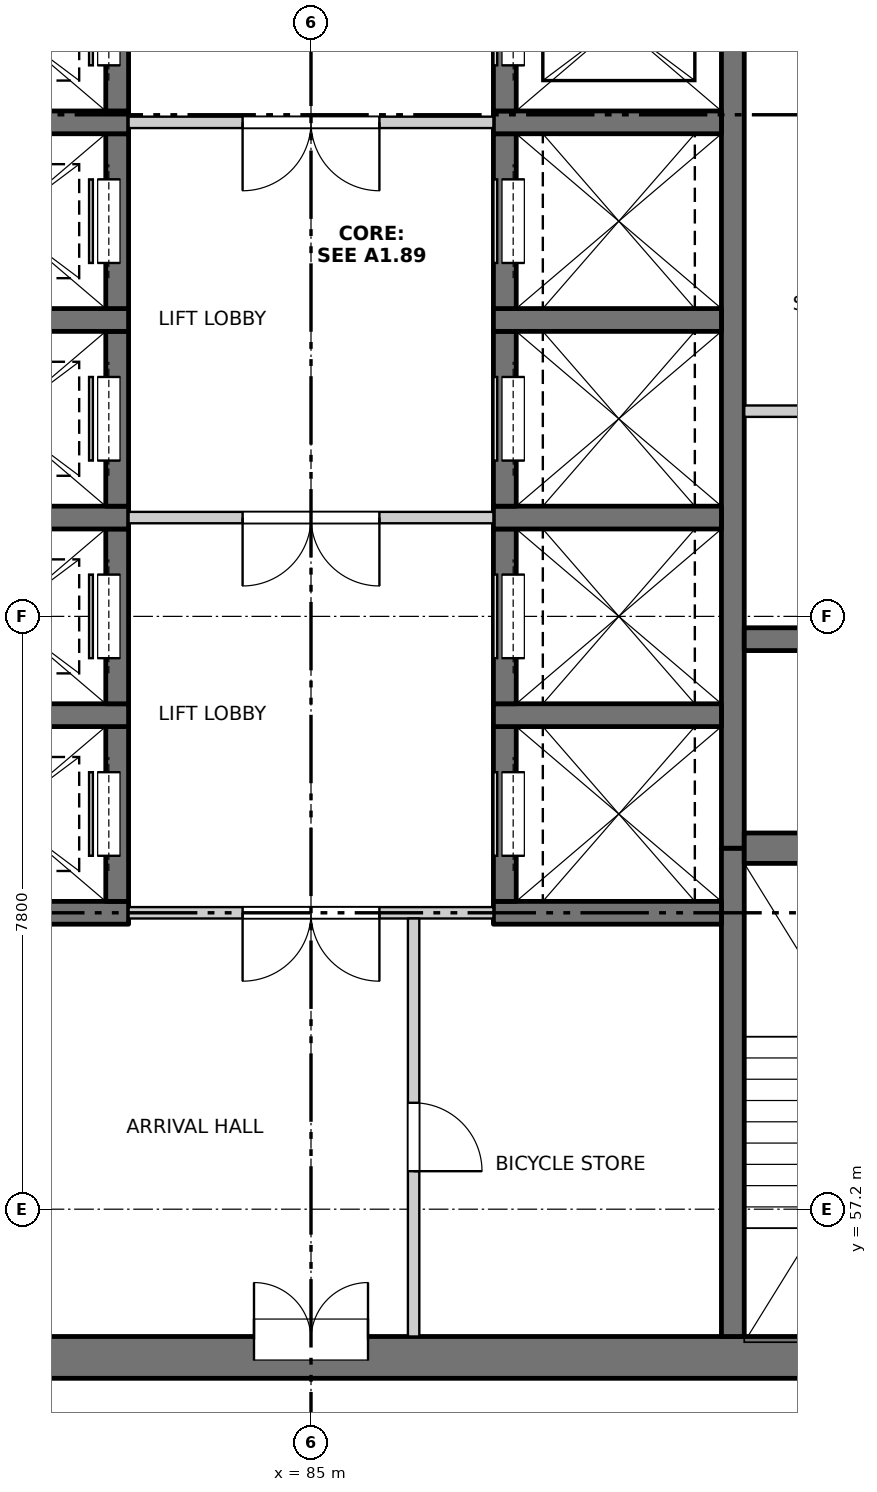
"""IFC4 building model, lengths in metres.
Left out: names, types, materials, properties, quantities, classifications, styles, units other than length and angle.
Written with IfcOpenShell. Run it as: python <this file> out.ifc"""

import sys

from ifc_helpers import new_model, si_unit, direction, frame, frame_2d, origin, place, context, subcontext, project, spatial, rectangle, extrude, element, fill, save


model = new_model("IFC4")
c1 = context("Model", 3, precision=1e-05, world=origin(), true_north=direction((0.0, 1.0)))
c2 = subcontext(c1, "Body", "Model", "MODEL_VIEW")
j1 = project(units=[si_unit("LENGTHUNIT", "METRE"), si_unit("PLANEANGLEUNIT", "RADIAN")], contexts=[c1])
p1 = place(None, origin())
s1 = spatial("IfcSite", under=j1, at=p1, CompositionType="ELEMENT")
p2 = place(p1, origin())
s2 = spatial("IfcBuilding", under=s1, at=p2, CompositionType="ELEMENT")
p3 = place(p2, frame((0.0, 0.0, 133.9)))
s3 = spatial("IfcBuildingStorey", under=s2, at=p3, CompositionType="ELEMENT", Elevation=133.9)
p4 = place(p3, frame((75.525, 55.25, -0.25), z_axis=(0.0, 0.0, 1.0), x_axis=(1.0, 0.0, 0.0)))
e1 = element("IfcWall", 1, at=p4, inside=s3, PredefinedType="SOLIDWALL", context=c2, shape_type="SweptSolid", body=[
    extrude(rectangle(XDim=18.95, YDim=0.55, at=frame_2d((9.475, 0.0))), origin(), (0.0, 0.0, 1.0), 3.4),
])
p5 = place(p4, frame((8.725, 0.0, 0.25)))
e2 = element("IfcOpeningElement", 2, at=p5, cuts=e1, PredefinedType="OPENING", context=c2, shape_type="SweptSolid", body=[
    extrude(rectangle(XDim=1.5, YDim=2.1, at=frame_2d((0.75, 1.05))), frame((0.0, 0.285, 0.0), z_axis=(0.0, -1.0, 0.0), x_axis=(1.0, 0.0, 0.0)), (0.0, 0.0, 1.0), 0.57),
])
p6 = place(p3, frame((90.55, 55.525, -0.25), z_axis=(0.0, 0.0, 1.0), x_axis=(0.0, 1.0, 0.0)))
e3 = element("IfcWall", 3, at=p6, inside=s3, PredefinedType="SOLIDWALL", context=c2, shape_type="SweptSolid", body=[
    extrude(rectangle(XDim=6.425, YDim=0.3, at=frame_2d((3.212, 0.0))), origin(), (0.0, 0.0, 1.0), 3.4),
])
p7 = place(p3, frame((90.55, 61.95, -0.25), z_axis=(0.0, 0.0, 1.0), x_axis=(0.0, 1.0, 0.0)))
e4 = element("IfcWall", 4, at=p7, inside=s3, PredefinedType="SOLIDWALL", context=c2, shape_type="SweptSolid", body=[
    extrude(rectangle(XDim=15.35, YDim=0.3, at=frame_2d((7.675, 0.0))), origin(), (0.0, 0.0, 1.0), 3.4),
])
p8 = place(p3, frame((79.6, 61.1, -0.25), z_axis=(0.0, 0.0, 1.0), x_axis=(1.0, 0.0, 0.0)))
e5 = element("IfcWall", 5, at=p8, inside=s3, PredefinedType="SOLIDWALL", context=c2, shape_type="SweptSolid", body=[
    extrude(rectangle(XDim=3.0, YDim=0.3, at=frame_2d((1.5, 0.0))), origin(), (0.0, 0.0, 1.0), 3.4),
])
p9 = place(p3, frame((82.45, 61.25, -0.25), z_axis=(0.0, 0.0, 1.0), x_axis=(0.0, 1.0, 0.0)))
e6 = element("IfcWall", 6, at=p9, inside=s3, PredefinedType="SOLIDWALL", context=c2, shape_type="SweptSolid", body=[
    extrude(rectangle(XDim=2.3, YDim=0.3, at=frame_2d((1.15, 0.0))), origin(), (0.0, 0.0, 1.0), 3.4),
])
p10 = place(p9, frame((0.6, 0.0, 0.25)))
e7 = element("IfcOpeningElement", 7, at=p10, cuts=e6, PredefinedType="OPENING", context=c2, shape_type="SweptSolid", body=[
    extrude(rectangle(XDim=1.1, YDim=2.1, at=frame_2d((0.55, 1.05))), frame((0.0, 0.16, 0.0), z_axis=(0.0, -1.0, 0.0), x_axis=(1.0, 0.0, 0.0)), (0.0, 0.0, 1.0), 0.32),
])
p11 = place(p3, frame((79.6, 63.7, -0.25), z_axis=(0.0, 0.0, 1.0), x_axis=(1.0, 0.0, 0.0)))
e8 = element("IfcWall", 8, at=p11, inside=s3, PredefinedType="SOLIDWALL", context=c2, shape_type="SweptSolid", body=[
    extrude(rectangle(XDim=3.0, YDim=0.3, at=frame_2d((1.5, 0.0))), origin(), (0.0, 0.0, 1.0), 3.4),
])
p12 = place(p3, frame((82.45, 63.85, -0.25), z_axis=(0.0, 0.0, 1.0), x_axis=(0.0, 1.0, 0.0)))
e9 = element("IfcWall", 9, at=p12, inside=s3, PredefinedType="SOLIDWALL", context=c2, shape_type="SweptSolid", body=[
    extrude(rectangle(XDim=2.3, YDim=0.3, at=frame_2d((1.15, 0.0))), origin(), (0.0, 0.0, 1.0), 3.4),
])
p13 = place(p12, frame((0.6, 0.0, 0.25)))
e10 = element("IfcOpeningElement", 10, at=p13, cuts=e9, PredefinedType="OPENING", context=c2, shape_type="SweptSolid", body=[
    extrude(rectangle(XDim=1.1, YDim=2.1, at=frame_2d((0.55, 1.05))), frame((0.0, 0.16, 0.0), z_axis=(0.0, -1.0, 0.0), x_axis=(1.0, 0.0, 0.0)), (0.0, 0.0, 1.0), 0.32),
])
p14 = place(p3, frame((79.6, 66.3, -0.25), z_axis=(0.0, 0.0, 1.0), x_axis=(1.0, 0.0, 0.0)))
e11 = element("IfcWall", 11, at=p14, inside=s3, PredefinedType="SOLIDWALL", context=c2, shape_type="SweptSolid", body=[
    extrude(rectangle(XDim=3.0, YDim=0.3, at=frame_2d((1.5, 0.0))), origin(), (0.0, 0.0, 1.0), 3.4),
])
p15 = place(p3, frame((82.45, 66.45, -0.25), z_axis=(0.0, 0.0, 1.0), x_axis=(0.0, 1.0, 0.0)))
e12 = element("IfcWall", 12, at=p15, inside=s3, PredefinedType="SOLIDWALL", context=c2, shape_type="SweptSolid", body=[
    extrude(rectangle(XDim=2.3, YDim=0.3, at=frame_2d((1.15, 0.0))), origin(), (0.0, 0.0, 1.0), 3.4),
])
p16 = place(p15, frame((0.6, 0.0, 0.25)))
e13 = element("IfcOpeningElement", 13, at=p16, cuts=e12, PredefinedType="OPENING", context=c2, shape_type="SweptSolid", body=[
    extrude(rectangle(XDim=1.1, YDim=2.1, at=frame_2d((0.55, 1.05))), frame((0.0, 0.16, 0.0), z_axis=(0.0, -1.0, 0.0), x_axis=(1.0, 0.0, 0.0)), (0.0, 0.0, 1.0), 0.32),
])
p17 = place(p3, frame((79.6, 68.9, -0.25), z_axis=(0.0, 0.0, 1.0), x_axis=(1.0, 0.0, 0.0)))
e14 = element("IfcWall", 14, at=p17, inside=s3, PredefinedType="SOLIDWALL", context=c2, shape_type="SweptSolid", body=[
    extrude(rectangle(XDim=3.0, YDim=0.3, at=frame_2d((1.5, 0.0))), origin(), (0.0, 0.0, 1.0), 3.4),
])
p18 = place(p3, frame((82.45, 69.05, -0.25), z_axis=(0.0, 0.0, 1.0), x_axis=(0.0, 1.0, 0.0)))
e15 = element("IfcWall", 15, at=p18, inside=s3, PredefinedType="SOLIDWALL", context=c2, shape_type="SweptSolid", body=[
    extrude(rectangle(XDim=2.3, YDim=0.3, at=frame_2d((1.15, 0.0))), origin(), (0.0, 0.0, 1.0), 3.4),
])
p19 = place(p18, frame((0.6, 0.0, 0.25)))
e16 = element("IfcOpeningElement", 16, at=p19, cuts=e15, PredefinedType="OPENING", context=c2, shape_type="SweptSolid", body=[
    extrude(rectangle(XDim=1.1, YDim=2.1, at=frame_2d((0.55, 1.05))), frame((0.0, 0.16, 0.0), z_axis=(0.0, -1.0, 0.0), x_axis=(1.0, 0.0, 0.0)), (0.0, 0.0, 1.0), 0.32),
])
p20 = place(p3, frame((79.6, 71.5, -0.25), z_axis=(0.0, 0.0, 1.0), x_axis=(1.0, 0.0, 0.0)))
e17 = element("IfcWall", 17, at=p20, inside=s3, PredefinedType="SOLIDWALL", context=c2, shape_type="SweptSolid", body=[
    extrude(rectangle(XDim=3.0, YDim=0.3, at=frame_2d((1.5, 0.0))), origin(), (0.0, 0.0, 1.0), 3.4),
])
p21 = place(p3, frame((82.45, 71.65, -0.25), z_axis=(0.0, 0.0, 1.0), x_axis=(0.0, 1.0, 0.0)))
e18 = element("IfcWall", 18, at=p21, inside=s3, PredefinedType="SOLIDWALL", context=c2, shape_type="SweptSolid", body=[
    extrude(rectangle(XDim=2.3, YDim=0.3, at=frame_2d((1.15, 0.0))), origin(), (0.0, 0.0, 1.0), 3.4),
])
p22 = place(p21, frame((0.6, 0.0, 0.25)))
e19 = element("IfcOpeningElement", 19, at=p22, cuts=e18, PredefinedType="OPENING", context=c2, shape_type="SweptSolid", body=[
    extrude(rectangle(XDim=1.1, YDim=2.1, at=frame_2d((0.55, 1.05))), frame((0.0, 0.16, 0.0), z_axis=(0.0, -1.0, 0.0), x_axis=(1.0, 0.0, 0.0)), (0.0, 0.0, 1.0), 0.32),
])
p23 = place(p3, frame((87.4, 61.1, -0.25), z_axis=(0.0, 0.0, 1.0), x_axis=(1.0, 0.0, 0.0)))
e20 = element("IfcWall", 20, at=p23, inside=s3, PredefinedType="SOLIDWALL", context=c2, shape_type="SweptSolid", body=[
    extrude(rectangle(XDim=3.0, YDim=0.3, at=frame_2d((1.5, 0.0))), origin(), (0.0, 0.0, 1.0), 3.4),
])
p24 = place(p3, frame((87.55, 61.25, -0.25), z_axis=(0.0, 0.0, 1.0), x_axis=(0.0, 1.0, 0.0)))
e21 = element("IfcWall", 21, at=p24, inside=s3, PredefinedType="SOLIDWALL", context=c2, shape_type="SweptSolid", body=[
    extrude(rectangle(XDim=2.3, YDim=0.3, at=frame_2d((1.15, 0.0))), origin(), (0.0, 0.0, 1.0), 3.4),
])
p25 = place(p24, frame((0.6, 0.0, 0.25)))
e22 = element("IfcOpeningElement", 22, at=p25, cuts=e21, PredefinedType="OPENING", context=c2, shape_type="SweptSolid", body=[
    extrude(rectangle(XDim=1.1, YDim=2.1, at=frame_2d((0.55, 1.05))), frame((0.0, 0.16, 0.0), z_axis=(0.0, -1.0, 0.0), x_axis=(1.0, 0.0, 0.0)), (0.0, 0.0, 1.0), 0.32),
])
p26 = place(p3, frame((87.4, 63.7, -0.25), z_axis=(0.0, 0.0, 1.0), x_axis=(1.0, 0.0, 0.0)))
e23 = element("IfcWall", 23, at=p26, inside=s3, PredefinedType="SOLIDWALL", context=c2, shape_type="SweptSolid", body=[
    extrude(rectangle(XDim=3.0, YDim=0.3, at=frame_2d((1.5, 0.0))), origin(), (0.0, 0.0, 1.0), 3.4),
])
p27 = place(p3, frame((87.55, 63.85, -0.25), z_axis=(0.0, 0.0, 1.0), x_axis=(0.0, 1.0, 0.0)))
e24 = element("IfcWall", 24, at=p27, inside=s3, PredefinedType="SOLIDWALL", context=c2, shape_type="SweptSolid", body=[
    extrude(rectangle(XDim=2.3, YDim=0.3, at=frame_2d((1.15, 0.0))), origin(), (0.0, 0.0, 1.0), 3.4),
])
p28 = place(p27, frame((0.6, 0.0, 0.25)))
e25 = element("IfcOpeningElement", 25, at=p28, cuts=e24, PredefinedType="OPENING", context=c2, shape_type="SweptSolid", body=[
    extrude(rectangle(XDim=1.1, YDim=2.1, at=frame_2d((0.55, 1.05))), frame((0.0, 0.16, 0.0), z_axis=(0.0, -1.0, 0.0), x_axis=(1.0, 0.0, 0.0)), (0.0, 0.0, 1.0), 0.32),
])
p29 = place(p3, frame((87.4, 66.3, -0.25), z_axis=(0.0, 0.0, 1.0), x_axis=(1.0, 0.0, 0.0)))
e26 = element("IfcWall", 26, at=p29, inside=s3, PredefinedType="SOLIDWALL", context=c2, shape_type="SweptSolid", body=[
    extrude(rectangle(XDim=3.0, YDim=0.3, at=frame_2d((1.5, 0.0))), origin(), (0.0, 0.0, 1.0), 3.4),
])
p30 = place(p3, frame((87.55, 66.45, -0.25), z_axis=(0.0, 0.0, 1.0), x_axis=(0.0, 1.0, 0.0)))
e27 = element("IfcWall", 27, at=p30, inside=s3, PredefinedType="SOLIDWALL", context=c2, shape_type="SweptSolid", body=[
    extrude(rectangle(XDim=2.3, YDim=0.3, at=frame_2d((1.15, 0.0))), origin(), (0.0, 0.0, 1.0), 3.4),
])
p31 = place(p30, frame((0.6, 0.0, 0.25)))
e28 = element("IfcOpeningElement", 28, at=p31, cuts=e27, PredefinedType="OPENING", context=c2, shape_type="SweptSolid", body=[
    extrude(rectangle(XDim=1.1, YDim=2.1, at=frame_2d((0.55, 1.05))), frame((0.0, 0.16, 0.0), z_axis=(0.0, -1.0, 0.0), x_axis=(1.0, 0.0, 0.0)), (0.0, 0.0, 1.0), 0.32),
])
p32 = place(p3, frame((87.4, 68.9, -0.25), z_axis=(0.0, 0.0, 1.0), x_axis=(1.0, 0.0, 0.0)))
e29 = element("IfcWall", 29, at=p32, inside=s3, PredefinedType="SOLIDWALL", context=c2, shape_type="SweptSolid", body=[
    extrude(rectangle(XDim=3.0, YDim=0.3, at=frame_2d((1.5, 0.0))), origin(), (0.0, 0.0, 1.0), 3.4),
])
p33 = place(p3, frame((87.55, 69.05, -0.25), z_axis=(0.0, 0.0, 1.0), x_axis=(0.0, 1.0, 0.0)))
e30 = element("IfcWall", 30, at=p33, inside=s3, PredefinedType="SOLIDWALL", context=c2, shape_type="SweptSolid", body=[
    extrude(rectangle(XDim=2.3, YDim=0.3, at=frame_2d((1.15, 0.0))), origin(), (0.0, 0.0, 1.0), 3.4),
])
p34 = place(p33, frame((0.6, 0.0, 0.25)))
e31 = element("IfcOpeningElement", 31, at=p34, cuts=e30, PredefinedType="OPENING", context=c2, shape_type="SweptSolid", body=[
    extrude(rectangle(XDim=1.1, YDim=2.1, at=frame_2d((0.55, 1.05))), frame((0.0, 0.16, 0.0), z_axis=(0.0, -1.0, 0.0), x_axis=(1.0, 0.0, 0.0)), (0.0, 0.0, 1.0), 0.32),
])
p35 = place(p3, frame((87.4, 71.5, -0.25), z_axis=(0.0, 0.0, 1.0), x_axis=(1.0, 0.0, 0.0)))
e32 = element("IfcWall", 32, at=p35, inside=s3, PredefinedType="SOLIDWALL", context=c2, shape_type="SweptSolid", body=[
    extrude(rectangle(XDim=3.0, YDim=0.3, at=frame_2d((1.5, 0.0))), origin(), (0.0, 0.0, 1.0), 3.4),
])
p36 = place(p3, frame((87.55, 71.65, -0.25), z_axis=(0.0, 0.0, 1.0), x_axis=(0.0, 1.0, 0.0)))
e33 = element("IfcWall", 33, at=p36, inside=s3, PredefinedType="SOLIDWALL", context=c2, shape_type="SweptSolid", body=[
    extrude(rectangle(XDim=2.3, YDim=0.3, at=frame_2d((1.15, 0.0))), origin(), (0.0, 0.0, 1.0), 3.4),
])
p37 = place(p36, frame((0.6, 0.0, 0.25)))
e34 = element("IfcOpeningElement", 34, at=p37, cuts=e33, PredefinedType="OPENING", context=c2, shape_type="SweptSolid", body=[
    extrude(rectangle(XDim=1.1, YDim=2.1, at=frame_2d((0.55, 1.05))), frame((0.0, 0.16, 0.0), z_axis=(0.0, -1.0, 0.0), x_axis=(1.0, 0.0, 0.0)), (0.0, 0.0, 1.0), 0.32),
])
p38 = place(p3, frame((90.7, 61.95, -0.25), z_axis=(0.0, 0.0, 1.0), x_axis=(1.0, 0.0, 0.0)))
e35 = element("IfcWall", 35, at=p38, inside=s3, PredefinedType="SOLIDWALL", context=c2, shape_type="SweptSolid", body=[
    extrude(rectangle(XDim=3.775, YDim=0.4, at=frame_2d((1.888, 0.0))), origin(), (0.0, 0.0, 1.0), 3.4),
])
p39 = place(p3, frame((90.7, 64.7, -0.25), z_axis=(0.0, 0.0, 1.0), x_axis=(1.0, 0.0, 0.0)))
e36 = element("IfcWall", 36, at=p39, inside=s3, PredefinedType="SOLIDWALL", context=c2, shape_type="SweptSolid", body=[
    extrude(rectangle(XDim=3.775, YDim=0.3, at=frame_2d((1.888, 0.0))), origin(), (0.0, 0.0, 1.0), 3.4),
])
p40 = place(p3, frame((82.6, 61.1, 0.0), z_axis=(0.0, 0.0, 1.0), x_axis=(1.0, 0.0, 0.0)))
e37 = element("IfcWall", 37, at=p40, inside=s3, PredefinedType="PARTITIONING", context=c2, shape_type="SweptSolid", body=[
    extrude(rectangle(XDim=4.8, YDim=0.15, at=frame_2d((2.4, 0.0))), origin(), (0.0, 0.0, 1.0), 3.15),
])
p41 = place(p40, frame((1.5, 0.0, 0.0)))
e38 = element("IfcOpeningElement", 38, at=p41, cuts=e37, PredefinedType="OPENING", context=c2, shape_type="SweptSolid", body=[
    extrude(rectangle(XDim=1.8, YDim=2.1, at=frame_2d((0.9, 1.05))), frame((0.0, 0.085, 0.0), z_axis=(0.0, -1.0, 0.0), x_axis=(1.0, 0.0, 0.0)), (0.0, 0.0, 1.0), 0.17),
])
p42 = place(p3, frame((82.6, 66.3, 0.0), z_axis=(0.0, 0.0, 1.0), x_axis=(1.0, 0.0, 0.0)))
e39 = element("IfcWall", 39, at=p42, inside=s3, PredefinedType="PARTITIONING", context=c2, shape_type="SweptSolid", body=[
    extrude(rectangle(XDim=4.8, YDim=0.15, at=frame_2d((2.4, 0.0))), origin(), (0.0, 0.0, 1.0), 3.15),
])
p43 = place(p42, frame((1.5, 0.0, 0.0)))
e40 = element("IfcOpeningElement", 40, at=p43, cuts=e39, PredefinedType="OPENING", context=c2, shape_type="SweptSolid", body=[
    extrude(rectangle(XDim=1.8, YDim=2.1, at=frame_2d((0.9, 1.05))), frame((0.0, 0.085, 0.0), z_axis=(0.0, -1.0, 0.0), x_axis=(1.0, 0.0, 0.0)), (0.0, 0.0, 1.0), 0.17),
])
p44 = place(p3, frame((90.7, 67.7, 0.0), z_axis=(0.0, 0.0, 1.0), x_axis=(1.0, 0.0, 0.0)))
e41 = element("IfcWall", 41, at=p44, inside=s3, PredefinedType="PARTITIONING", context=c2, shape_type="SweptSolid", body=[
    extrude(rectangle(XDim=3.775, YDim=0.15, at=frame_2d((1.887, 0.0))), origin(), (0.0, 0.0, 1.0), 3.15),
])
p45 = place(p3, frame((82.6, 71.5, 0.0), z_axis=(0.0, 0.0, 1.0), x_axis=(1.0, 0.0, 0.0)))
e42 = element("IfcWall", 42, at=p45, inside=s3, PredefinedType="PARTITIONING", context=c2, shape_type="SweptSolid", body=[
    extrude(rectangle(XDim=4.8, YDim=0.15, at=frame_2d((2.4, 0.0))), origin(), (0.0, 0.0, 1.0), 3.15),
])
p46 = place(p45, frame((1.5, 0.0, 0.0)))
e43 = element("IfcOpeningElement", 43, at=p46, cuts=e42, PredefinedType="OPENING", context=c2, shape_type="SweptSolid", body=[
    extrude(rectangle(XDim=1.8, YDim=2.1, at=frame_2d((0.9, 1.05))), frame((0.0, 0.085, 0.0), z_axis=(0.0, -1.0, 0.0), x_axis=(1.0, 0.0, 0.0)), (0.0, 0.0, 1.0), 0.17),
])
p47 = place(p3, frame((86.35, 55.525, 0.0), z_axis=(0.0, 0.0, 1.0), x_axis=(0.0, 1.0, 0.0)))
e44 = element("IfcWall", 44, at=p47, inside=s3, PredefinedType="PARTITIONING", context=c2, shape_type="SweptSolid", body=[
    extrude(rectangle(XDim=5.5, YDim=0.15, at=frame_2d((2.75, 0.0))), origin(), (0.0, 0.0, 1.0), 3.15),
])
p48 = place(p47, frame((2.175, 0.0, 0.0)))
e45 = element("IfcOpeningElement", 45, at=p48, cuts=e44, PredefinedType="OPENING", context=c2, shape_type="SweptSolid", body=[
    extrude(rectangle(XDim=0.9, YDim=2.1, at=frame_2d((0.45, 1.05))), frame((0.0, 0.085, 0.0), z_axis=(0.0, -1.0, 0.0), x_axis=(1.0, 0.0, 0.0)), (0.0, 0.0, 1.0), 0.17),
])
p49 = place(p5, origin())
e46 = element("IfcDoor", 46, at=p49, inside=s3, OperationType="DOUBLE_DOOR_SINGLE_SWING", PredefinedType="DOOR", context=c2, shape_type="SweptSolid", body=[
    extrude(rectangle(XDim=1.5, YDim=2.1, at=frame_2d((0.75, 1.05))), frame((0.0, 0.26, 0.0), z_axis=(0.0, -1.0, 0.0), x_axis=(1.0, 0.0, 0.0)), (0.0, 0.0, 1.0), 0.05),
])
fill(e2, e46)
p50 = place(p48, origin())
e47 = element("IfcDoor", 47, at=p50, inside=s3, OperationType="SINGLE_SWING_RIGHT", PredefinedType="DOOR", context=c2, shape_type="SweptSolid", body=[
    extrude(rectangle(XDim=0.9, YDim=2.1, at=frame_2d((0.45, 1.05))), frame((0.0, 0.025, 0.0), z_axis=(0.0, -1.0, 0.0), x_axis=(1.0, 0.0, 0.0)), (0.0, 0.0, 1.0), 0.05),
])
fill(e45, e47)
p51 = place(p41, origin())
e48 = element("IfcDoor", 48, at=p51, inside=s3, OperationType="DOUBLE_DOOR_SINGLE_SWING", PredefinedType="DOOR", context=c2, shape_type="SweptSolid", body=[
    extrude(rectangle(XDim=1.8, YDim=2.1, at=frame_2d((0.9, 1.05))), frame((0.0, 0.025, 0.0), z_axis=(0.0, -1.0, 0.0), x_axis=(1.0, 0.0, 0.0)), (0.0, 0.0, 1.0), 0.05),
])
fill(e38, e48)
p52 = place(p10, origin())
e49 = element("IfcDoor", 49, at=p52, inside=s3, OperationType="SLIDING_TO_RIGHT", PredefinedType="DOOR", context=c2, shape_type="SweptSolid", body=[
    extrude(rectangle(XDim=1.1, YDim=2.1, at=frame_2d((0.55, 1.05))), frame((0.0, 0.135, 0.0), z_axis=(0.0, -1.0, 0.0), x_axis=(1.0, 0.0, 0.0)), (0.0, 0.0, 1.0), 0.05),
])
fill(e7, e49)
p53 = place(p25, origin())
e50 = element("IfcDoor", 50, at=p53, inside=s3, OperationType="SLIDING_TO_RIGHT", PredefinedType="DOOR", context=c2, shape_type="SweptSolid", body=[
    extrude(rectangle(XDim=1.1, YDim=2.1, at=frame_2d((0.55, 1.05))), frame((0.0, -0.085, 0.0), z_axis=(0.0, -1.0, 0.0), x_axis=(1.0, 0.0, 0.0)), (0.0, 0.0, 1.0), 0.05),
])
fill(e22, e50)
p54 = place(p13, origin())
e51 = element("IfcDoor", 51, at=p54, inside=s3, OperationType="SLIDING_TO_RIGHT", PredefinedType="DOOR", context=c2, shape_type="SweptSolid", body=[
    extrude(rectangle(XDim=1.1, YDim=2.1, at=frame_2d((0.55, 1.05))), frame((0.0, 0.135, 0.0), z_axis=(0.0, -1.0, 0.0), x_axis=(1.0, 0.0, 0.0)), (0.0, 0.0, 1.0), 0.05),
])
fill(e10, e51)
p55 = place(p28, origin())
e52 = element("IfcDoor", 52, at=p55, inside=s3, OperationType="SLIDING_TO_RIGHT", PredefinedType="DOOR", context=c2, shape_type="SweptSolid", body=[
    extrude(rectangle(XDim=1.1, YDim=2.1, at=frame_2d((0.55, 1.05))), frame((0.0, -0.085, 0.0), z_axis=(0.0, -1.0, 0.0), x_axis=(1.0, 0.0, 0.0)), (0.0, 0.0, 1.0), 0.05),
])
fill(e25, e52)
p56 = place(p43, origin())
e53 = element("IfcDoor", 53, at=p56, inside=s3, OperationType="DOUBLE_DOOR_SINGLE_SWING", PredefinedType="DOOR", context=c2, shape_type="SweptSolid", body=[
    extrude(rectangle(XDim=1.8, YDim=2.1, at=frame_2d((0.9, 1.05))), frame((0.0, 0.025, 0.0), z_axis=(0.0, -1.0, 0.0), x_axis=(1.0, 0.0, 0.0)), (0.0, 0.0, 1.0), 0.05),
])
fill(e40, e53)
p57 = place(p16, origin())
e54 = element("IfcDoor", 54, at=p57, inside=s3, OperationType="SLIDING_TO_RIGHT", PredefinedType="DOOR", context=c2, shape_type="SweptSolid", body=[
    extrude(rectangle(XDim=1.1, YDim=2.1, at=frame_2d((0.55, 1.05))), frame((0.0, 0.135, 0.0), z_axis=(0.0, -1.0, 0.0), x_axis=(1.0, 0.0, 0.0)), (0.0, 0.0, 1.0), 0.05),
])
fill(e13, e54)
p58 = place(p31, origin())
e55 = element("IfcDoor", 55, at=p58, inside=s3, OperationType="SLIDING_TO_RIGHT", PredefinedType="DOOR", context=c2, shape_type="SweptSolid", body=[
    extrude(rectangle(XDim=1.1, YDim=2.1, at=frame_2d((0.55, 1.05))), frame((0.0, -0.085, 0.0), z_axis=(0.0, -1.0, 0.0), x_axis=(1.0, 0.0, 0.0)), (0.0, 0.0, 1.0), 0.05),
])
fill(e28, e55)
p59 = place(p19, origin())
e56 = element("IfcDoor", 56, at=p59, inside=s3, OperationType="SLIDING_TO_LEFT", PredefinedType="DOOR", context=c2, shape_type="SweptSolid", body=[
    extrude(rectangle(XDim=1.1, YDim=2.1, at=frame_2d((0.55, 1.05))), frame((0.0, 0.135, 0.0), z_axis=(0.0, -1.0, 0.0), x_axis=(1.0, 0.0, 0.0)), (0.0, 0.0, 1.0), 0.05),
])
fill(e16, e56)
p60 = place(p34, origin())
e57 = element("IfcDoor", 57, at=p60, inside=s3, OperationType="SLIDING_TO_LEFT", PredefinedType="DOOR", context=c2, shape_type="SweptSolid", body=[
    extrude(rectangle(XDim=1.1, YDim=2.1, at=frame_2d((0.55, 1.05))), frame((0.0, -0.085, 0.0), z_axis=(0.0, -1.0, 0.0), x_axis=(1.0, 0.0, 0.0)), (0.0, 0.0, 1.0), 0.05),
])
fill(e31, e57)
p61 = place(p46, origin())
e58 = element("IfcDoor", 58, at=p61, inside=s3, OperationType="DOUBLE_DOOR_SINGLE_SWING", PredefinedType="DOOR", context=c2, shape_type="SweptSolid", body=[
    extrude(rectangle(XDim=1.8, YDim=2.1, at=frame_2d((0.9, 1.05))), frame((0.0, 0.025, 0.0), z_axis=(0.0, -1.0, 0.0), x_axis=(1.0, 0.0, 0.0)), (0.0, 0.0, 1.0), 0.05),
])
fill(e43, e58)
p62 = place(p22, origin())
e59 = element("IfcDoor", 59, at=p62, inside=s3, OperationType="SLIDING_TO_LEFT", PredefinedType="DOOR", context=c2, shape_type="SweptSolid", body=[
    extrude(rectangle(XDim=1.1, YDim=2.1, at=frame_2d((0.55, 1.05))), frame((0.0, 0.135, 0.0), z_axis=(0.0, -1.0, 0.0), x_axis=(1.0, 0.0, 0.0)), (0.0, 0.0, 1.0), 0.05),
])
fill(e19, e59)
p63 = place(p37, origin())
e60 = element("IfcDoor", 60, at=p63, inside=s3, OperationType="SLIDING_TO_LEFT", PredefinedType="DOOR", context=c2, shape_type="SweptSolid", body=[
    extrude(rectangle(XDim=1.1, YDim=2.1, at=frame_2d((0.55, 1.05))), frame((0.0, -0.085, 0.0), z_axis=(0.0, -1.0, 0.0), x_axis=(1.0, 0.0, 0.0)), (0.0, 0.0, 1.0), 0.05),
])
fill(e34, e60)
save(model, sys.argv[1])
